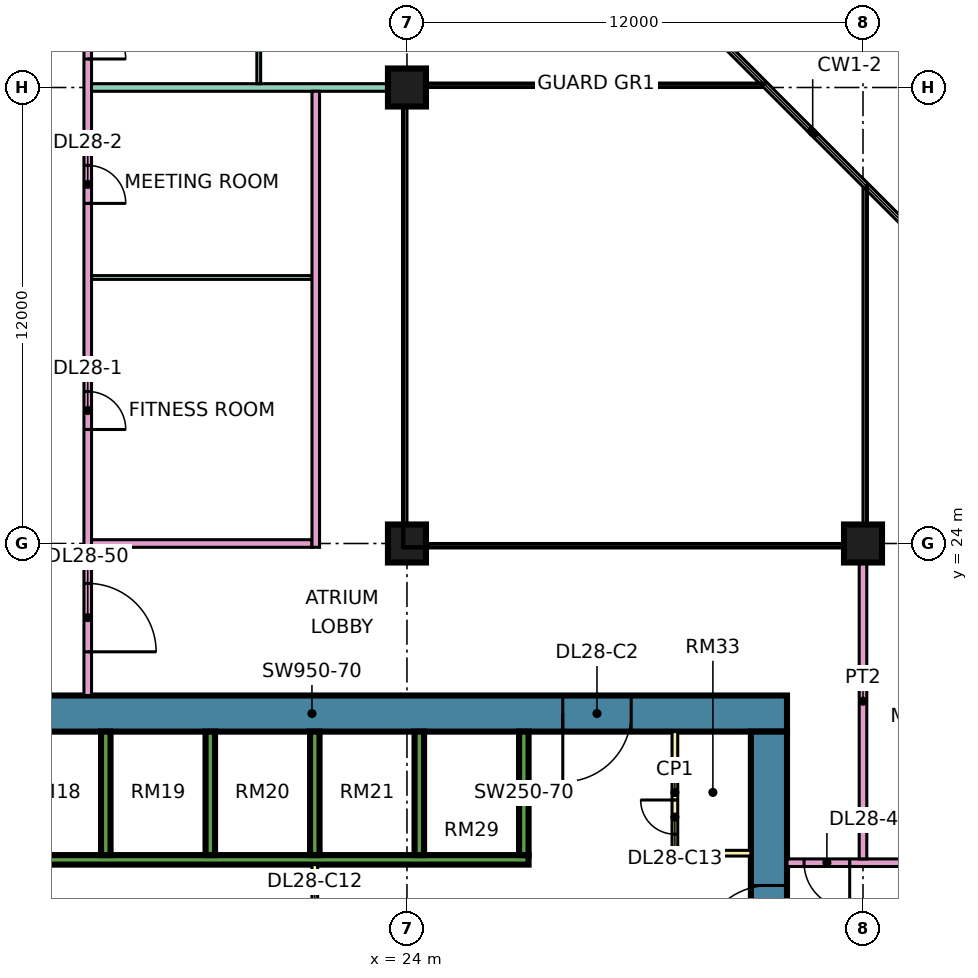
"""IFC4 building model, lengths in metres.
Left out: names, types, materials, properties, quantities, classifications, styles, units other than length and angle.
Written with IfcOpenShell. Run it as: python <this file> out.ifc"""

import sys

from ifc_helpers import new_model, si_unit, direction, frame, frame_2d, origin, origin_2d, place, context, subcontext, project, spatial, rectangle, extrude, element, fill, save


model = new_model("IFC4")
c1 = context("Model", 3, precision=1e-05, world=origin(), true_north=direction((0.0, 1.0)))
c2 = subcontext(c1, "Body", "Model", "MODEL_VIEW")
j1 = project(units=[si_unit("LENGTHUNIT", "METRE"), si_unit("PLANEANGLEUNIT", "RADIAN")], contexts=[c1])
p1 = place(None, origin())
s1 = spatial("IfcSite", under=j1, at=p1, CompositionType="ELEMENT")
p2 = place(p1, origin())
s2 = spatial("IfcBuilding", under=s1, at=p2, CompositionType="ELEMENT")
p3 = place(p2, frame((0.0, 0.0, 121.9)))
s3 = spatial("IfcBuildingStorey", under=s2, at=p3, CompositionType="ELEMENT", Elevation=121.9)
for number, where, z_axis, x_axis in (
    (1, (24.0, 24.0, 0.0), (0.0, 0.0, 1.0), (1.0, 0.0, 0.0)),
    (2, (24.0, 36.0, 0.0), (0.0, 0.0, 1.0), (1.0, 0.0, 0.0)),
    (3, (36.0, 24.0, 0.0), (0.0, 0.0, 1.0), (1.0, 0.0, 0.0)),
):
    element("IfcColumn", number, at=place(p3, frame(where, z_axis=z_axis, x_axis=x_axis)), inside=s3, PredefinedType="COLUMN", context=c2, shape_type="SweptSolid", body=[
        extrude(rectangle(XDim=1.0, YDim=1.0, at=origin_2d()), origin(), (0.0, 0.0, 1.0), 3.75),
    ])
p4 = place(p3, frame((9.0, 19.525, 0.0), z_axis=(0.0, 0.0, 1.0), x_axis=(1.0, 0.0, 0.0)))
e4 = element("IfcWall", 4, at=p4, inside=s3, PredefinedType="SHEAR", context=c2, shape_type="SweptSolid", body=[
    extrude(rectangle(XDim=25.0, YDim=0.95, at=frame_2d((12.5, 0.0))), origin(), (0.0, 0.0, 1.0), 3.75),
])
p5 = place(p4, frame((19.1, 0.0, 0.0)))
e5 = element("IfcOpeningElement", 5, at=p5, cuts=e4, PredefinedType="OPENING", context=c2, shape_type="SweptSolid", body=[
    extrude(rectangle(XDim=1.8, YDim=2.4, at=frame_2d((0.9, 1.2))), frame((0.0, 0.485, 0.0), z_axis=(0.0, -1.0, 0.0), x_axis=(1.0, 0.0, 0.0)), (0.0, 0.0, 1.0), 0.97),
])
p6 = place(p3, frame((33.525, 7.95, 0.0), z_axis=(0.0, 0.0, 1.0), x_axis=(0.0, 1.0, 0.0)))
e6 = element("IfcWall", 6, at=p6, inside=s3, PredefinedType="SHEAR", context=c2, shape_type="SweptSolid", body=[
    extrude(rectangle(XDim=11.1, YDim=0.95, at=frame_2d((5.55, 0.0))), origin(), (0.0, 0.0, 1.0), 3.75),
])
p7 = place(p6, frame((5.25, 0.0, 0.0)))
e7 = element("IfcOpeningElement", 7, at=p7, cuts=e6, PredefinedType="OPENING", context=c2, shape_type="SweptSolid", body=[
    extrude(rectangle(XDim=1.8, YDim=2.4, at=frame_2d((0.9, 1.2))), frame((0.0, 0.485, 0.0), z_axis=(0.0, -1.0, 0.0), x_axis=(1.0, 0.0, 0.0)), (0.0, 0.0, 1.0), 0.97),
])
p8 = place(p3, frame((13.45, 15.675, 0.0), z_axis=(0.0, 0.0, 1.0), x_axis=(1.0, 0.0, 0.0)))
e8 = element("IfcWall", 8, at=p8, inside=s3, PredefinedType="SHEAR", context=c2, shape_type="SweptSolid", body=[
    extrude(rectangle(XDim=13.75, YDim=0.25, at=frame_2d((6.875, 0.0))), origin(), (0.0, 0.0, 1.0), 3.75),
])
for number, where, z_axis, x_axis in (
    (9, (16.075, 15.8, 0.0), (0.0, 0.0, 1.0), (0.0, 1.0, 0.0)),
    (10, (18.825, 15.8, 0.0), (0.0, 0.0, 1.0), (0.0, 1.0, 0.0)),
    (11, (21.575, 15.8, 0.0), (0.0, 0.0, 1.0), (0.0, 1.0, 0.0)),
    (12, (24.325, 15.8, 0.0), (0.0, 0.0, 1.0), (0.0, 1.0, 0.0)),
    (13, (27.075, 15.8, 0.0), (0.0, 0.0, 1.0), (0.0, 1.0, 0.0)),
):
    element("IfcWall", number, at=place(p3, frame(where, z_axis=z_axis, x_axis=x_axis)), inside=s3, PredefinedType="SHEAR", context=c2, shape_type="SweptSolid", body=[
        extrude(rectangle(XDim=3.25, YDim=0.25, at=frame_2d((1.625, 0.0))), origin(), (0.0, 0.0, 1.0), 3.75),
    ])
p9 = place(p3, frame((21.575, 11.45, 0.0), z_axis=(0.0, 0.0, 1.0), x_axis=(0.0, 1.0, 0.0)))
e14 = element("IfcWall", 14, at=p9, inside=s3, PredefinedType="PARTITIONING", context=c2, shape_type="SweptSolid", body=[
    extrude(rectangle(XDim=4.1, YDim=0.15, at=frame_2d((2.05, 0.0))), origin(), (0.0, 0.0, 1.0), 3.35),
])
p10 = place(p9, frame((1.15, 0.0, 0.0)))
e15 = element("IfcOpeningElement", 15, at=p10, cuts=e14, PredefinedType="OPENING", context=c2, shape_type="SweptSolid", body=[
    extrude(rectangle(XDim=1.8, YDim=2.4, at=frame_2d((0.9, 1.2))), frame((0.0, 0.085, 0.0), z_axis=(0.0, -1.0, 0.0), x_axis=(1.0, 0.0, 0.0)), (0.0, 0.0, 1.0), 0.17),
])
p11 = place(p3, frame((31.05, 15.85, 0.0), z_axis=(0.0, 0.0, 1.0), x_axis=(0.0, 1.0, 0.0)))
e16 = element("IfcWall", 16, at=p11, inside=s3, PredefinedType="PARTITIONING", context=c2, shape_type="SweptSolid", body=[
    extrude(rectangle(XDim=3.2, YDim=0.15, at=frame_2d((1.6, 0.0))), origin(), (0.0, 0.0, 1.0), 3.35),
])
p12 = place(p11, frame((0.5, 0.0, 0.0)))
e17 = element("IfcOpeningElement", 17, at=p12, cuts=e16, PredefinedType="OPENING", context=c2, shape_type="SweptSolid", body=[
    extrude(rectangle(XDim=0.9, YDim=2.1, at=frame_2d((0.45, 1.05))), frame((0.0, 0.085, 0.0), z_axis=(0.0, -1.0, 0.0), x_axis=(1.0, 0.0, 0.0)), (0.0, 0.0, 1.0), 0.17),
])
p13 = place(p3, frame((31.05, 15.85, 0.0), z_axis=(0.0, 0.0, 1.0), x_axis=(1.0, 0.0, 0.0)))
e18 = element("IfcWall", 18, at=p13, inside=s3, PredefinedType="PARTITIONING", context=c2, shape_type="SweptSolid", body=[
    extrude(rectangle(XDim=2.0, YDim=0.15, at=frame_2d((1.0, 0.0))), origin(), (0.0, 0.0, 1.0), 3.35),
])
p14 = place(p3, frame((15.6, 20.0, 0.0), z_axis=(0.0, 0.0, 1.0), x_axis=(0.0, 1.0, 0.0)))
e19 = element("IfcWall", 19, at=p14, inside=s3, PredefinedType="PARTITIONING", context=c2, shape_type="SweptSolid", body=[
    extrude(rectangle(XDim=27.775, YDim=0.2, at=frame_2d((13.887, 0.0))), origin(), (0.0, 0.0, 1.0), 3.35),
])
p15 = place(p14, frame((7.0, 0.0, 0.0)))
e20 = element("IfcOpeningElement", 20, at=p15, cuts=e19, PredefinedType="OPENING", context=c2, shape_type="SweptSolid", body=[
    extrude(rectangle(XDim=1.0, YDim=2.1, at=frame_2d((0.5, 1.05))), frame((0.0, 0.11, 0.0), z_axis=(0.0, -1.0, 0.0), x_axis=(1.0, 0.0, 0.0)), (0.0, 0.0, 1.0), 0.22),
])
p16 = place(p14, frame((12.95, 0.0, 0.0)))
e21 = element("IfcOpeningElement", 21, at=p16, cuts=e19, PredefinedType="OPENING", context=c2, shape_type="SweptSolid", body=[
    extrude(rectangle(XDim=1.0, YDim=2.1, at=frame_2d((0.5, 1.05))), frame((0.0, 0.11, 0.0), z_axis=(0.0, -1.0, 0.0), x_axis=(1.0, 0.0, 0.0)), (0.0, 0.0, 1.0), 0.22),
])
p17 = place(p14, frame((16.75, 0.0, 0.0)))
e22 = element("IfcOpeningElement", 22, at=p17, cuts=e19, PredefinedType="OPENING", context=c2, shape_type="SweptSolid", body=[
    extrude(rectangle(XDim=1.0, YDim=2.1, at=frame_2d((0.5, 1.05))), frame((0.0, 0.11, 0.0), z_axis=(0.0, -1.0, 0.0), x_axis=(1.0, 0.0, 0.0)), (0.0, 0.0, 1.0), 0.22),
])
p18 = place(p14, frame((1.15, 0.0, 0.0)))
e23 = element("IfcOpeningElement", 23, at=p18, cuts=e19, PredefinedType="OPENING", context=c2, shape_type="SweptSolid", body=[
    extrude(rectangle(XDim=1.8, YDim=2.1, at=frame_2d((0.9, 1.05))), frame((0.0, 0.11, 0.0), z_axis=(0.0, -1.0, 0.0), x_axis=(1.0, 0.0, 0.0)), (0.0, 0.0, 1.0), 0.22),
])
p19 = place(p14, frame((25.9, 0.0, 0.0)))
e24 = element("IfcOpeningElement", 24, at=p19, cuts=e19, PredefinedType="OPENING", context=c2, shape_type="SweptSolid", body=[
    extrude(rectangle(XDim=1.0, YDim=2.1, at=frame_2d((0.5, 1.05))), frame((0.0, 0.11, 0.0), z_axis=(0.0, -1.0, 0.0), x_axis=(1.0, 0.0, 0.0)), (0.0, 0.0, 1.0), 0.22),
])
p20 = place(p3, frame((15.7, 24.0, 0.0), z_axis=(0.0, 0.0, 1.0), x_axis=(1.0, 0.0, 0.0)))
e25 = element("IfcWall", 25, at=p20, inside=s3, PredefinedType="PARTITIONING", context=c2, shape_type="SweptSolid", body=[
    extrude(rectangle(XDim=5.8, YDim=0.2, at=frame_2d((2.9, 0.0))), origin(), (0.0, 0.0, 1.0), 3.35),
])
p21 = place(p3, frame((15.7, 31.0, 0.0), z_axis=(0.0, 0.0, 1.0), x_axis=(1.0, 0.0, 0.0)))
e26 = element("IfcWall", 26, at=p21, inside=s3, PredefinedType="PARTITIONING", context=c2, shape_type="SweptSolid", body=[
    extrude(rectangle(XDim=5.8, YDim=0.1, at=frame_2d((2.9, 0.0))), origin(), (0.0, 0.0, 1.0), 3.35),
])
p22 = place(p3, frame((15.7, 36.0, 0.0), z_axis=(0.0, 0.0, 1.0), x_axis=(1.0, 0.0, 0.0)))
e27 = element("IfcWall", 27, at=p22, inside=s3, PredefinedType="PARTITIONING", context=c2, shape_type="SweptSolid", body=[
    extrude(rectangle(XDim=8.3, YDim=0.2, at=frame_2d((4.15, 0.0))), origin(), (0.0, 0.0, 1.0), 3.35),
])
p23 = place(p3, frame((20.1, 36.1, 0.0), z_axis=(0.0, 0.0, 1.0), x_axis=(0.0, 1.0, 0.0)))
e28 = element("IfcWall", 28, at=p23, inside=s3, PredefinedType="PARTITIONING", context=c2, shape_type="SweptSolid", body=[
    extrude(rectangle(XDim=2.85, YDim=0.1, at=frame_2d((1.425, 0.0))), origin(), (0.0, 0.0, 1.0), 3.35),
])
p24 = place(p23, frame((0.95, 0.0, 0.0)))
e29 = element("IfcOpeningElement", 29, at=p24, cuts=e28, PredefinedType="OPENING", context=c2, shape_type="SweptSolid", body=[
    extrude(rectangle(XDim=0.9, YDim=2.1, at=frame_2d((0.45, 1.05))), frame((0.0, 0.06, 0.0), z_axis=(0.0, -1.0, 0.0), x_axis=(1.0, 0.0, 0.0)), (0.0, 0.0, 1.0), 0.12),
])
p25 = place(p3, frame((21.6, 23.9, 0.0), z_axis=(0.0, 0.0, 1.0), x_axis=(0.0, 1.0, 0.0)))
e30 = element("IfcWall", 30, at=p25, inside=s3, PredefinedType="PARTITIONING", context=c2, shape_type="SweptSolid", body=[
    extrude(rectangle(XDim=12.0, YDim=0.2, at=frame_2d((6.0, 0.0))), origin(), (0.0, 0.0, 1.0), 3.35),
])
p26 = place(p3, frame((34.0, 15.6, 0.0), z_axis=(0.0, 0.0, 1.0), x_axis=(1.0, 0.0, 0.0)))
e31 = element("IfcWall", 31, at=p26, inside=s3, PredefinedType="PARTITIONING", context=c2, shape_type="SweptSolid", body=[
    extrude(rectangle(XDim=10.35, YDim=0.2, at=frame_2d((5.175, 0.0))), origin(), (0.0, 0.0, 1.0), 3.35),
])
p27 = place(p26, frame((5.6, 0.0, 0.0)))
e32 = element("IfcOpeningElement", 32, at=p27, cuts=e31, PredefinedType="OPENING", context=c2, shape_type="SweptSolid", body=[
    extrude(rectangle(XDim=1.0, YDim=2.1, at=frame_2d((0.5, 1.05))), frame((0.0, 0.11, 0.0), z_axis=(0.0, -1.0, 0.0), x_axis=(1.0, 0.0, 0.0)), (0.0, 0.0, 1.0), 0.22),
])
p28 = place(p26, frame((0.45, 0.0, 0.0)))
e33 = element("IfcOpeningElement", 33, at=p28, cuts=e31, PredefinedType="OPENING", context=c2, shape_type="SweptSolid", body=[
    extrude(rectangle(XDim=1.2, YDim=2.1, at=frame_2d((0.6, 1.05))), frame((0.0, 0.11, 0.0), z_axis=(0.0, -1.0, 0.0), x_axis=(1.0, 0.0, 0.0)), (0.0, 0.0, 1.0), 0.22),
])
p29 = place(p3, frame((36.0, 15.7, 0.0), z_axis=(0.0, 0.0, 1.0), x_axis=(0.0, 1.0, 0.0)))
e34 = element("IfcWall", 34, at=p29, inside=s3, PredefinedType="PARTITIONING", context=c2, shape_type="SweptSolid", body=[
    extrude(rectangle(XDim=8.3, YDim=0.2, at=frame_2d((4.15, 0.0))), origin(), (0.0, 0.0, 1.0), 3.35),
])
p30 = place(p7, origin())
e35 = element("IfcDoor", 35, at=p30, inside=s3, OperationType="DOUBLE_DOOR_SINGLE_SWING", PredefinedType="DOOR", context=c2, shape_type="SweptSolid", body=[
    extrude(rectangle(XDim=1.8, YDim=2.4, at=frame_2d((0.9, 1.2))), frame((0.0, 0.025, 0.0), z_axis=(0.0, -1.0, 0.0), x_axis=(1.0, 0.0, 0.0)), (0.0, 0.0, 1.0), 0.05),
])
fill(e7, e35)
p31 = place(p5, frame((1.8, 0.0, 0.0), z_axis=(0.0, 0.0, 1.0), x_axis=(-1.0, 0.0, 0.0)))
e36 = element("IfcDoor", 36, at=p31, inside=s3, OperationType="DOUBLE_DOOR_SINGLE_SWING", PredefinedType="DOOR", context=c2, shape_type="SweptSolid", body=[
    extrude(rectangle(XDim=1.8, YDim=2.4, at=frame_2d((0.9, 1.2))), frame((0.0, 0.025, 0.0), z_axis=(0.0, -1.0, 0.0), x_axis=(1.0, 0.0, 0.0)), (0.0, 0.0, 1.0), 0.05),
])
fill(e5, e36)
p32 = place(p12, frame((0.9, 0.0, 0.0), z_axis=(0.0, 0.0, 1.0), x_axis=(-1.0, 0.0, 0.0)))
e37 = element("IfcDoor", 37, at=p32, inside=s3, OperationType="SINGLE_SWING_RIGHT", PredefinedType="DOOR", context=c2, shape_type="SweptSolid", body=[
    extrude(rectangle(XDim=0.9, YDim=2.1, at=frame_2d((0.45, 1.05))), frame((0.0, 0.025, 0.0), z_axis=(0.0, -1.0, 0.0), x_axis=(1.0, 0.0, 0.0)), (0.0, 0.0, 1.0), 0.05),
])
fill(e17, e37)
p33 = place(p15, frame((1.0, 0.0, 0.0), z_axis=(0.0, 0.0, 1.0), x_axis=(-1.0, 0.0, 0.0)))
e38 = element("IfcDoor", 38, at=p33, inside=s3, OperationType="SINGLE_SWING_LEFT", PredefinedType="DOOR", context=c2, shape_type="SweptSolid", body=[
    extrude(rectangle(XDim=1.0, YDim=2.1, at=frame_2d((0.5, 1.05))), frame((0.0, 0.025, 0.0), z_axis=(0.0, -1.0, 0.0), x_axis=(1.0, 0.0, 0.0)), (0.0, 0.0, 1.0), 0.05),
])
fill(e20, e38)
p34 = place(p16, frame((1.0, 0.0, 0.0), z_axis=(0.0, 0.0, 1.0), x_axis=(-1.0, 0.0, 0.0)))
e39 = element("IfcDoor", 39, at=p34, inside=s3, OperationType="SINGLE_SWING_LEFT", PredefinedType="DOOR", context=c2, shape_type="SweptSolid", body=[
    extrude(rectangle(XDim=1.0, YDim=2.1, at=frame_2d((0.5, 1.05))), frame((0.0, 0.025, 0.0), z_axis=(0.0, -1.0, 0.0), x_axis=(1.0, 0.0, 0.0)), (0.0, 0.0, 1.0), 0.05),
])
fill(e21, e39)
p35 = place(p17, frame((1.0, 0.0, 0.0), z_axis=(0.0, 0.0, 1.0), x_axis=(-1.0, 0.0, 0.0)))
e40 = element("IfcDoor", 40, at=p35, inside=s3, OperationType="SINGLE_SWING_LEFT", PredefinedType="DOOR", context=c2, shape_type="SweptSolid", body=[
    extrude(rectangle(XDim=1.0, YDim=2.1, at=frame_2d((0.5, 1.05))), frame((0.0, 0.025, 0.0), z_axis=(0.0, -1.0, 0.0), x_axis=(1.0, 0.0, 0.0)), (0.0, 0.0, 1.0), 0.05),
])
fill(e22, e40)
p36 = place(p28, origin())
e41 = element("IfcDoor", 41, at=p36, inside=s3, OperationType="SINGLE_SWING_RIGHT", PredefinedType="DOOR", context=c2, shape_type="SweptSolid", body=[
    extrude(rectangle(XDim=1.2, YDim=2.1, at=frame_2d((0.6, 1.05))), frame((0.0, 0.025, 0.0), z_axis=(0.0, -1.0, 0.0), x_axis=(1.0, 0.0, 0.0)), (0.0, 0.0, 1.0), 0.05),
])
fill(e33, e41)
p37 = place(p18, frame((1.8, 0.0, 0.0), z_axis=(0.0, 0.0, 1.0), x_axis=(-1.0, 0.0, 0.0)))
e42 = element("IfcDoor", 42, at=p37, inside=s3, OperationType="DOUBLE_DOOR_SINGLE_SWING", PredefinedType="DOOR", context=c2, shape_type="SweptSolid", body=[
    extrude(rectangle(XDim=1.8, YDim=2.1, at=frame_2d((0.9, 1.05))), frame((0.0, 0.025, 0.0), z_axis=(0.0, -1.0, 0.0), x_axis=(1.0, 0.0, 0.0)), (0.0, 0.0, 1.0), 0.05),
])
fill(e23, e42)
save(model, sys.argv[1])
